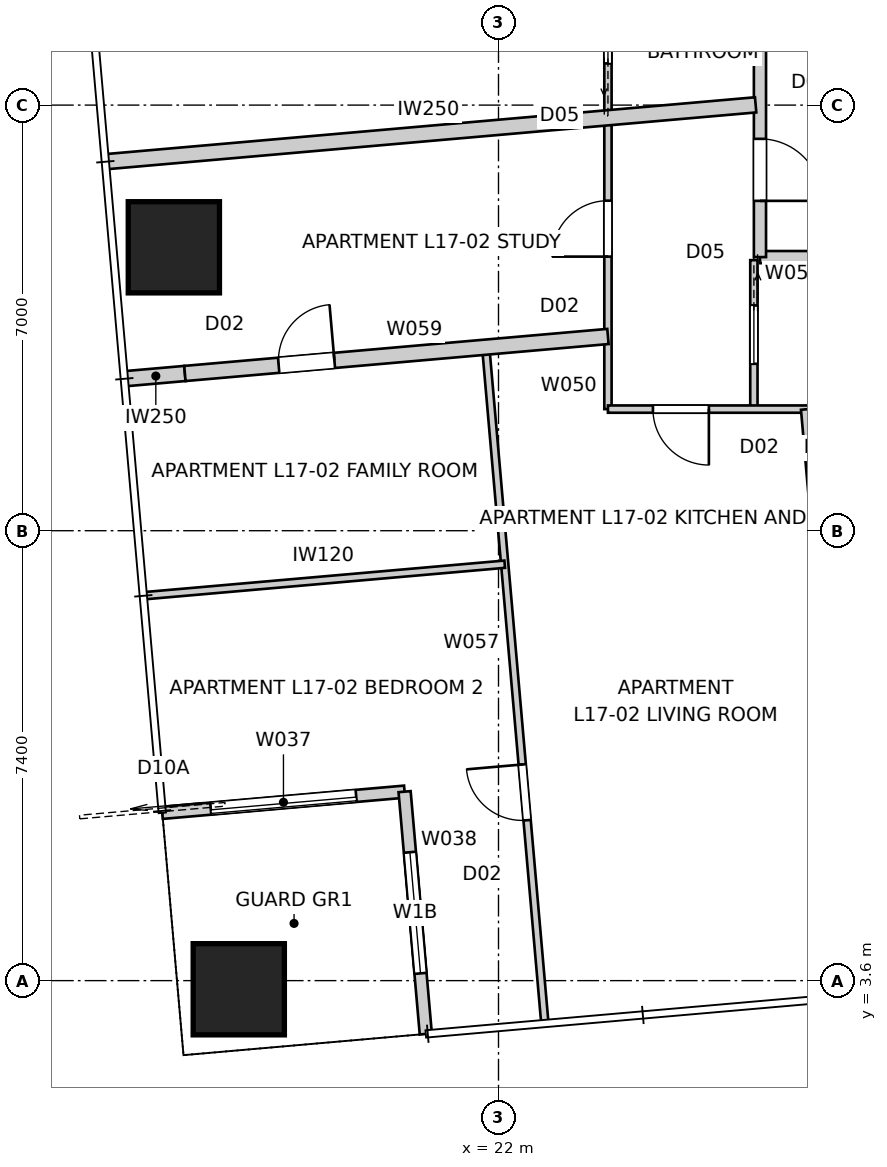
"""IFC4 building model, lengths in metres.
Left out: names, types, materials, properties, quantities, classifications, styles, units other than length and angle.
Written with IfcOpenShell. Run it as: python <this file> out.ifc"""

import sys

from ifc_helpers import new_model, si_unit, direction, frame, frame_2d, origin, origin_2d, place, context, subcontext, project, spatial, rectangle, extrude, element, fill, save


model = new_model("IFC4")
c1 = context("Model", 3, precision=1e-05, world=origin(), true_north=direction((0.0, 1.0)))
c2 = subcontext(c1, "Body", "Model", "MODEL_VIEW")
j1 = project(units=[si_unit("LENGTHUNIT", "METRE"), si_unit("PLANEANGLEUNIT", "RADIAN")], contexts=[c1])
p1 = place(None, origin())
s1 = spatial("IfcSite", under=j1, at=p1, CompositionType="ELEMENT")
p2 = place(p1, origin())
s2 = spatial("IfcBuilding", under=s1, at=p2, CompositionType="ELEMENT")
p3 = place(p2, frame((0.0, 0.0, 64.2)))
s3 = spatial("IfcBuildingStorey", under=s2, at=p3, CompositionType="ELEMENT", Elevation=64.2)
for number, where, z_axis, x_axis in (
    (1, (17.729, 3.458, 0.0), (0.0, 0.0, 1.0), (1.0, 0.0, 0.0)),
    (2, (16.661, 15.661, 0.0), (0.0, 0.0, 1.0), (1.0, 0.0, 0.0)),
):
    element("IfcColumn", number, at=place(p3, frame(where, z_axis=z_axis, x_axis=x_axis)), inside=s3, PredefinedType="COLUMN", context=c2, shape_type="SweptSolid", body=[
        extrude(rectangle(XDim=1.5, YDim=1.5, at=origin_2d()), origin(), (0.0, 0.0, 1.0), 3.4),
    ])
p4 = place(p3, frame((16.471, 6.359, 0.0), z_axis=(0.0, 0.0, 1.0), x_axis=(0.99619418125, 0.087161650072, 0.0)))
e3 = element("IfcWall", 3, at=p4, inside=s3, PredefinedType="SOLIDWALL", context=c2, shape_type="SweptSolid", body=[
    extrude(rectangle(XDim=4.0, YDim=0.2, at=frame_2d((2.0, 0.0))), origin(), (0.0, 0.0, 1.0), 3.25),
])
p5 = place(p4, frame((0.8, 0.0, 0.0)))
e4 = element("IfcOpeningElement", 4, at=p5, cuts=e3, PredefinedType="OPENING", context=c2, shape_type="SweptSolid", body=[
    extrude(rectangle(XDim=2.4, YDim=2.1, at=frame_2d((1.2, 1.05))), frame((0.0, 0.11, 0.0), z_axis=(0.0, -1.0, 0.0), x_axis=(1.0, 0.0, 0.0)), (0.0, 0.0, 1.0), 0.22),
])
p6 = place(p3, frame((20.456, 6.708, 0.0), z_axis=(0.0, 0.0, 1.0), x_axis=(0.087156350505, -0.99619464492, 0.0)))
e5 = element("IfcWall", 5, at=p6, inside=s3, PredefinedType="SOLIDWALL", context=c2, shape_type="SweptSolid", body=[
    extrude(rectangle(XDim=4.0, YDim=0.2, at=frame_2d((2.0, 0.0))), origin(), (0.0, 0.0, 1.0), 3.25),
])
p7 = place(p6, frame((1.0, 0.0, 0.45)))
e6 = element("IfcOpeningElement", 6, at=p7, cuts=e5, PredefinedType="OPENING", context=c2, shape_type="SweptSolid", body=[
    extrude(rectangle(XDim=2.0, YDim=1.8, at=frame_2d((1.0, 0.9))), frame((0.0, 0.11, 0.0), z_axis=(0.0, -1.0, 0.0), x_axis=(1.0, 0.0, 0.0)), (0.0, 0.0, 1.0), 0.22),
])
p8 = place(p3, frame((26.3, 15.5, 0.0), z_axis=(0.0, 0.0, 1.0), x_axis=(1.0, 0.0, 0.0)))
e7 = element("IfcWall", 7, at=p8, inside=s3, PredefinedType="PARTITIONING", context=c2, shape_type="SweptSolid", body=[
    extrude(rectangle(XDim=27.4, YDim=0.2, at=frame_2d((13.7, 0.0))), origin(), (0.0, 0.0, 1.0), 3.25),
])
p9 = place(p8, frame((18.776, 0.0, 0.0)))
e8 = element("IfcOpeningElement", 8, at=p9, cuts=e7, PredefinedType="OPENING", context=c2, shape_type="SweptSolid", body=[
    extrude(rectangle(XDim=1.02, YDim=2.34, at=frame_2d((0.51, 1.17))), frame((0.0, 0.11, 0.0), z_axis=(0.0, -1.0, 0.0), x_axis=(1.0, 0.0, 0.0)), (0.0, 0.0, 1.0), 0.22),
])
p10 = place(p8, frame((5.793, 0.0, 0.0)))
e9 = element("IfcOpeningElement", 9, at=p10, cuts=e7, PredefinedType="OPENING", context=c2, shape_type="SweptSolid", body=[
    extrude(rectangle(XDim=1.02, YDim=2.34, at=frame_2d((0.51, 1.17))), frame((0.0, 0.11, 0.0), z_axis=(0.0, -1.0, 0.0), x_axis=(1.0, 0.0, 0.0)), (0.0, 0.0, 1.0), 0.22),
])
p11 = place(p3, frame((26.3, 44.5, 0.0), z_axis=(0.0, 0.0, 1.0), x_axis=(0.0, -1.0, 0.0)))
e10 = element("IfcWall", 10, at=p11, inside=s3, PredefinedType="PARTITIONING", context=c2, shape_type="SweptSolid", body=[
    extrude(rectangle(XDim=29.0, YDim=0.2, at=frame_2d((14.5, 0.0))), origin(), (0.0, 0.0, 1.0), 3.25),
])
p12 = place(p11, frame((6.85, 0.0, 0.0)))
e11 = element("IfcOpeningElement", 11, at=p12, cuts=e10, PredefinedType="OPENING", context=c2, shape_type="SweptSolid", body=[
    extrude(rectangle(XDim=1.02, YDim=2.34, at=frame_2d((0.51, 1.17))), frame((0.0, 0.11, 0.0), z_axis=(0.0, -1.0, 0.0), x_axis=(1.0, 0.0, 0.0)), (0.0, 0.0, 1.0), 0.22),
])
p13 = place(p11, frame((2.345, 0.0, 0.0)))
e12 = element("IfcOpeningElement", 12, at=p13, cuts=e10, PredefinedType="OPENING", context=c2, shape_type="SweptSolid", body=[
    extrude(rectangle(XDim=1.02, YDim=2.1, at=frame_2d((0.51, 1.05))), frame((0.0, 0.11, 0.0), z_axis=(0.0, -1.0, 0.0), x_axis=(1.0, 0.0, 0.0)), (0.0, 0.0, 1.0), 0.22),
])
p14 = place(p11, frame((17.166, 0.0, 0.0)))
e13 = element("IfcOpeningElement", 13, at=p14, cuts=e10, PredefinedType="OPENING", context=c2, shape_type="SweptSolid", body=[
    extrude(rectangle(XDim=1.02, YDim=2.34, at=frame_2d((0.51, 1.17))), frame((0.0, 0.11, 0.0), z_axis=(0.0, -1.0, 0.0), x_axis=(1.0, 0.0, 0.0)), (0.0, 0.0, 1.0), 0.22),
])
p15 = place(p11, frame((27.055, 0.0, 0.0)))
e14 = element("IfcOpeningElement", 14, at=p15, cuts=e10, PredefinedType="OPENING", context=c2, shape_type="SweptSolid", body=[
    extrude(rectangle(XDim=1.02, YDim=2.34, at=frame_2d((0.51, 1.17))), frame((0.0, 0.11, 0.0), z_axis=(0.0, -1.0, 0.0), x_axis=(1.0, 0.0, 0.0)), (0.0, 0.0, 1.0), 0.22),
])
p16 = place(p3, frame((15.534, 17.068, 0.0), z_axis=(0.0, 0.0, 1.0), x_axis=(0.996193939644, 0.08716441141, 0.0)))
e15 = element("IfcWall", 15, at=p16, inside=s3, PredefinedType="PARTITIONING", context=c2, shape_type="SweptSolid", body=[
    extrude(rectangle(XDim=10.736, YDim=0.25, at=frame_2d((5.368, 0.0))), origin(), (0.0, 0.0, 1.0), 3.25),
])
p17 = place(p3, frame((23.8, 13.0, 0.0), z_axis=(0.0, 0.0, 1.0), x_axis=(0.0, 1.0, 0.0)))
e16 = element("IfcWall", 16, at=p17, inside=s3, PredefinedType="PARTITIONING", context=c2, shape_type="SweptSolid", body=[
    extrude(rectangle(XDim=8.439, YDim=0.12, at=frame_2d((4.219, 0.0))), origin(), (0.0, 0.0, 1.0), 2.55),
])
p18 = place(p17, frame((2.508, 0.0, 0.0)))
e17 = element("IfcOpeningElement", 17, at=p18, cuts=e16, PredefinedType="OPENING", context=c2, shape_type="SweptSolid", body=[
    extrude(rectangle(XDim=0.92, YDim=2.34, at=frame_2d((0.46, 1.17))), frame((0.0, 0.07, 0.0), z_axis=(0.0, -1.0, 0.0), x_axis=(1.0, 0.0, 0.0)), (0.0, 0.0, 1.0), 0.14),
])
p19 = place(p17, frame((5.685, 0.0, 0.0)))
e18 = element("IfcOpeningElement", 18, at=p19, cuts=e16, PredefinedType="OPENING", context=c2, shape_type="SweptSolid", body=[
    extrude(rectangle(XDim=0.96, YDim=2.1, at=frame_2d((0.48, 1.05))), frame((0.0, 0.07, 0.0), z_axis=(0.0, -1.0, 0.0), x_axis=(1.0, 0.0, 0.0)), (0.0, 0.0, 1.0), 0.14),
])
p20 = place(p3, frame((26.2, 15.45, 0.0), z_axis=(0.0, 0.0, 1.0), x_axis=(0.0, -1.0, 0.0)))
e19 = element("IfcWall", 19, at=p20, inside=s3, PredefinedType="PARTITIONING", context=c2, shape_type="SweptSolid", body=[
    extrude(rectangle(XDim=2.45, YDim=0.12, at=frame_2d((1.225, 0.0))), origin(), (0.0, 0.0, 1.0), 3.25),
])
p21 = place(p20, frame((0.745, 0.0, 0.0)))
e20 = element("IfcOpeningElement", 20, at=p21, cuts=e19, PredefinedType="OPENING", context=c2, shape_type="SweptSolid", body=[
    extrude(rectangle(XDim=0.96, YDim=2.1, at=frame_2d((0.48, 1.05))), frame((0.0, 0.07, 0.0), z_axis=(0.0, -1.0, 0.0), x_axis=(1.0, 0.0, 0.0)), (0.0, 0.0, 1.0), 0.14),
])
p22 = place(p3, frame((30.333, 13.0, 0.0), z_axis=(0.0, 0.0, 1.0), x_axis=(-1.0, 0.0, 0.0)))
e21 = element("IfcWall", 21, at=p22, inside=s3, PredefinedType="PARTITIONING", context=c2, shape_type="SweptSolid", body=[
    extrude(rectangle(XDim=6.533, YDim=0.12, at=frame_2d((3.267, 0.0))), origin(), (0.0, 0.0, 1.0), 3.25),
])
p23 = place(p22, frame((4.873, 0.0, 0.0)))
e22 = element("IfcOpeningElement", 22, at=p23, cuts=e21, PredefinedType="OPENING", context=c2, shape_type="SweptSolid", body=[
    extrude(rectangle(XDim=0.92, YDim=2.34, at=frame_2d((0.46, 1.17))), frame((0.0, 0.07, 0.0), z_axis=(0.0, -1.0, 0.0), x_axis=(1.0, 0.0, 0.0)), (0.0, 0.0, 1.0), 0.14),
])
p24 = place(p22, frame((1.162, 0.0, 0.0)))
e23 = element("IfcOpeningElement", 23, at=p24, cuts=e21, PredefinedType="OPENING", context=c2, shape_type="SweptSolid", body=[
    extrude(rectangle(XDim=0.96, YDim=2.1, at=frame_2d((0.48, 1.05))), frame((0.0, 0.07, 0.0), z_axis=(0.0, -1.0, 0.0), x_axis=(1.0, 0.0, 0.0)), (0.0, 0.0, 1.0), 0.14),
])
p25 = place(p3, frame((22.759, 2.934, 0.0), z_axis=(0.0, 0.0, 1.0), x_axis=(-0.087130477128, 0.996196908224, 0.0)))
e24 = element("IfcWall", 24, at=p25, inside=s3, PredefinedType="PARTITIONING", context=c2, shape_type="SweptSolid", body=[
    extrude(rectangle(XDim=11.127, YDim=0.12, at=frame_2d((5.563, 0.0))), origin(), (0.0, 0.0, 1.0), 3.25),
])
p26 = place(p25, frame((3.317, 0.0, 0.0)))
e25 = element("IfcOpeningElement", 25, at=p26, cuts=e24, PredefinedType="OPENING", context=c2, shape_type="SweptSolid", body=[
    extrude(rectangle(XDim=0.92, YDim=2.34, at=frame_2d((0.46, 1.17))), frame((0.0, 0.07, 0.0), z_axis=(0.0, -1.0, 0.0), x_axis=(1.0, 0.0, 0.0)), (0.0, 0.0, 1.0), 0.14),
])
p27 = place(p3, frame((15.886, 13.502, 0.0), z_axis=(0.0, 0.0, 1.0), x_axis=(0.996187918168, 0.087233202944, 0.0)))
e26 = element("IfcWall", 26, at=p27, inside=s3, PredefinedType="PARTITIONING", context=c2, shape_type="SweptSolid", body=[
    extrude(rectangle(XDim=0.96, YDim=0.25, at=frame_2d((0.48, 0.0))), origin(), (0.0, 0.0, 1.0), 3.25),
])
p28 = place(p3, frame((16.843, 13.586, 0.0), z_axis=(0.0, 0.0, 1.0), x_axis=(0.996195462691, 0.087147002895, 0.0)))
e27 = element("IfcWall", 27, at=p28, inside=s3, PredefinedType="PARTITIONING", context=c2, shape_type="SweptSolid", body=[
    extrude(rectangle(XDim=6.984, YDim=0.25, at=frame_2d((3.492, 0.0))), origin(), (0.0, 0.0, 1.0), 2.638),
])
p29 = place(p28, frame((1.548, 0.0, 0.0)))
e28 = element("IfcOpeningElement", 28, at=p29, cuts=e27, PredefinedType="OPENING", context=c2, shape_type="SweptSolid", body=[
    extrude(rectangle(XDim=0.92, YDim=2.34, at=frame_2d((0.46, 1.17))), frame((0.0, 0.135, 0.0), z_axis=(0.0, -1.0, 0.0), x_axis=(1.0, 0.0, 0.0)), (0.0, 0.0, 1.0), 0.27),
])
p30 = place(p3, frame((27.099, 13.0, 0.0), z_axis=(0.0, 0.0, 1.0), x_axis=(0.087158236544, -0.99619447991, 0.0)))
e29 = element("IfcWall", 29, at=p30, inside=s3, PredefinedType="PARTITIONING", context=c2, shape_type="SweptSolid", body=[
    extrude(rectangle(XDim=8.689, YDim=0.25, at=frame_2d((4.344, 0.0))), origin(), (0.0, 0.0, 1.0), 2.638),
])
p31 = place(p3, frame((16.198, 9.933, 0.0), z_axis=(0.0, 0.0, 1.0), x_axis=(0.996196712973, 0.08713270948, 0.0)))
e30 = element("IfcWall", 30, at=p31, inside=s3, PredefinedType="PARTITIONING", context=c2, shape_type="SweptSolid", body=[
    extrude(rectangle(XDim=5.926, YDim=0.12, at=frame_2d((2.963, 0.0))), origin(), (0.0, 0.0, 1.0), 3.25),
])
p32 = place(p5, origin())
e31 = element("IfcDoor", 31, at=p32, inside=s3, OperationType="SLIDING_TO_LEFT", PredefinedType="DOOR", context=c2, shape_type="SweptSolid", body=[
    extrude(rectangle(XDim=2.4, YDim=2.1, at=frame_2d((1.2, 1.05))), frame((0.0, 0.025, 0.0), z_axis=(0.0, -1.0, 0.0), x_axis=(1.0, 0.0, 0.0)), (0.0, 0.0, 1.0), 0.05),
])
fill(e4, e31)
p33 = place(p7, origin())
e32 = element("IfcWindow", 32, at=p33, inside=s3, PartitioningType="SINGLE_PANEL", PredefinedType="WINDOW", context=c2, shape_type="SweptSolid", body=[
    extrude(rectangle(XDim=2.0, YDim=1.8, at=frame_2d((1.0, 0.9))), frame((0.0, 0.03, 0.0), z_axis=(0.0, -1.0, 0.0), x_axis=(1.0, 0.0, 0.0)), (0.0, 0.0, 1.0), 0.06),
])
fill(e6, e32)
p34 = place(p15, origin())
e33 = element("IfcDoor", 33, at=p34, inside=s3, OperationType="SINGLE_SWING_RIGHT", PredefinedType="DOOR", context=c2, shape_type="SweptSolid", body=[
    extrude(rectangle(XDim=1.02, YDim=2.34, at=frame_2d((0.51, 1.17))), frame((0.0, 0.025, 0.0), z_axis=(0.0, -1.0, 0.0), x_axis=(1.0, 0.0, 0.0)), (0.0, 0.0, 1.0), 0.05),
])
fill(e14, e33)
p35 = place(p18, origin())
e34 = element("IfcDoor", 34, at=p35, inside=s3, OperationType="SINGLE_SWING_LEFT", PredefinedType="DOOR", context=c2, shape_type="SweptSolid", body=[
    extrude(rectangle(XDim=0.92, YDim=2.34, at=frame_2d((0.46, 1.17))), frame((0.0, 0.025, 0.0), z_axis=(0.0, -1.0, 0.0), x_axis=(1.0, 0.0, 0.0)), (0.0, 0.0, 1.0), 0.05),
])
fill(e17, e34)
p36 = place(p21, origin())
e35 = element("IfcDoor", 35, at=p36, inside=s3, OperationType="SLIDING_TO_LEFT", PredefinedType="DOOR", context=c2, shape_type="SweptSolid", body=[
    extrude(rectangle(XDim=0.96, YDim=2.1, at=frame_2d((0.48, 1.05))), frame((0.0, 0.025, 0.0), z_axis=(0.0, -1.0, 0.0), x_axis=(1.0, 0.0, 0.0)), (0.0, 0.0, 1.0), 0.05),
])
fill(e20, e35)
p37 = place(p23, origin())
e36 = element("IfcDoor", 36, at=p37, inside=s3, OperationType="SINGLE_SWING_LEFT", PredefinedType="DOOR", context=c2, shape_type="SweptSolid", body=[
    extrude(rectangle(XDim=0.92, YDim=2.34, at=frame_2d((0.46, 1.17))), frame((0.0, 0.025, 0.0), z_axis=(0.0, -1.0, 0.0), x_axis=(1.0, 0.0, 0.0)), (0.0, 0.0, 1.0), 0.05),
])
fill(e22, e36)
p38 = place(p29, origin())
e37 = element("IfcDoor", 37, at=p38, inside=s3, OperationType="SINGLE_SWING_RIGHT", PredefinedType="DOOR", context=c2, shape_type="SweptSolid", body=[
    extrude(rectangle(XDim=0.92, YDim=2.34, at=frame_2d((0.46, 1.17))), frame((0.0, 0.025, 0.0), z_axis=(0.0, -1.0, 0.0), x_axis=(1.0, 0.0, 0.0)), (0.0, 0.0, 1.0), 0.05),
])
fill(e28, e37)
p39 = place(p26, origin())
e38 = element("IfcDoor", 38, at=p39, inside=s3, OperationType="SINGLE_SWING_RIGHT", PredefinedType="DOOR", context=c2, shape_type="SweptSolid", body=[
    extrude(rectangle(XDim=0.92, YDim=2.34, at=frame_2d((0.46, 1.17))), frame((0.0, 0.025, 0.0), z_axis=(0.0, -1.0, 0.0), x_axis=(1.0, 0.0, 0.0)), (0.0, 0.0, 1.0), 0.05),
])
fill(e25, e38)
p40 = place(p19, origin())
e39 = element("IfcDoor", 39, at=p40, inside=s3, OperationType="SLIDING_TO_LEFT", PredefinedType="DOOR", context=c2, shape_type="SweptSolid", body=[
    extrude(rectangle(XDim=0.96, YDim=2.1, at=frame_2d((0.48, 1.05))), frame((0.0, 0.025, 0.0), z_axis=(0.0, -1.0, 0.0), x_axis=(1.0, 0.0, 0.0)), (0.0, 0.0, 1.0), 0.05),
])
fill(e18, e39)
save(model, sys.argv[1])
